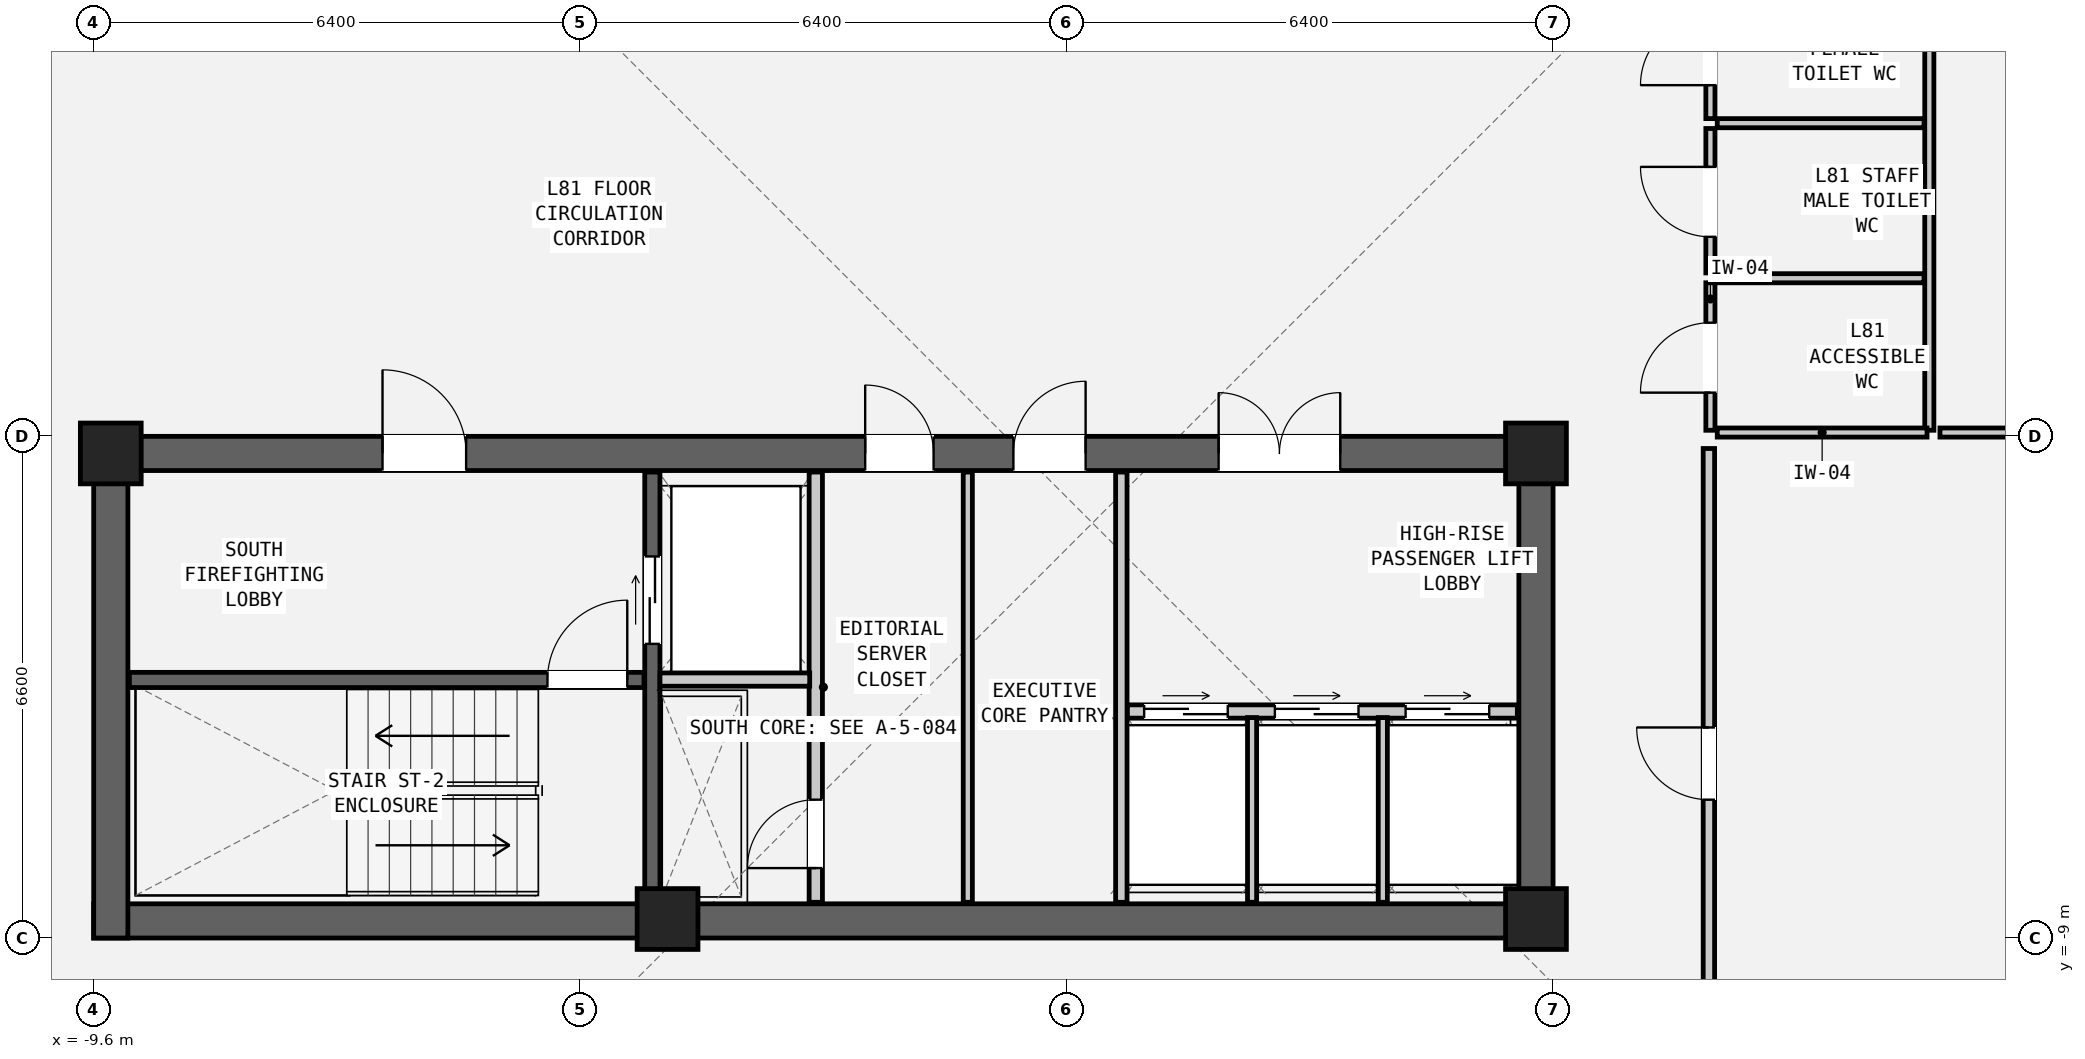
"""IFC4 building model, lengths in metres.
Left out: names, types, materials, properties, quantities, classifications, styles, units other than length and angle.
Written with IfcOpenShell. Run it as: python <this file> out.ifc"""

import sys

from ifc_helpers import new_model, si_unit, direction, frame, frame_2d, origin, origin_2d, place, context, subcontext, project, spatial, rectangle, extrude, element, fill, save


model = new_model("IFC4")
c1 = context("Model", 3, precision=1e-05, world=origin(), true_north=direction((0.0, 1.0)))
c2 = subcontext(c1, "Body", "Model", "MODEL_VIEW")
j1 = project(units=[si_unit("LENGTHUNIT", "METRE"), si_unit("PLANEANGLEUNIT", "RADIAN")], contexts=[c1])
p1 = place(None, origin())
s1 = spatial("IfcSite", under=j1, at=p1, CompositionType="ELEMENT")
p2 = place(p1, origin())
s2 = spatial("IfcBuilding", under=s1, at=p2, CompositionType="ELEMENT")
p3 = place(p2, frame((0.0, 0.0, 273.35)))
s3 = spatial("IfcBuildingStorey", under=s2, at=p3, CompositionType="ELEMENT", Elevation=273.35)
p4 = place(p3, frame((-9.6, -8.775, 0.0), z_axis=(0.0, 0.0, 1.0), x_axis=(1.0, 0.0, 0.0)))
e1 = element("IfcWall", 1, at=p4, inside=s3, PredefinedType="SHEAR", context=c2, shape_type="SweptSolid", body=[
    extrude(rectangle(XDim=19.2, YDim=0.45, at=frame_2d((9.6, 0.0))), origin(), (0.0, 0.0, 1.0), 3.6),
])
p5 = place(p3, frame((-9.6, -2.625, 0.0), z_axis=(0.0, 0.0, 1.0), x_axis=(1.0, 0.0, 0.0)))
e2 = element("IfcWall", 2, at=p5, inside=s3, PredefinedType="SHEAR", context=c2, shape_type="SweptSolid", body=[
    extrude(rectangle(XDim=19.2, YDim=0.45, at=frame_2d((9.6, 0.0))), origin(), (0.0, 0.0, 1.0), 3.6),
])
p6 = place(p5, frame((3.8, 0.0, 0.0)))
e3 = element("IfcOpeningElement", 3, at=p6, cuts=e2, PredefinedType="OPENING", context=c2, shape_type="SweptSolid", body=[
    extrude(rectangle(XDim=1.1, YDim=2.08, at=frame_2d((0.55, 1.04))), frame((0.0, 0.237, 0.0), z_axis=(0.0, -1.0, 0.0), x_axis=(1.0, 0.0, 0.0)), (0.0, 0.0, 1.0), 0.474),
])
p7 = place(p5, frame((10.15, 0.0, 0.0)))
e4 = element("IfcOpeningElement", 4, at=p7, cuts=e2, PredefinedType="OPENING", context=c2, shape_type="SweptSolid", body=[
    extrude(rectangle(XDim=0.9, YDim=2.05, at=frame_2d((0.45, 1.025))), frame((0.0, 0.237, 0.0), z_axis=(0.0, -1.0, 0.0), x_axis=(1.0, 0.0, 0.0)), (0.0, 0.0, 1.0), 0.474),
])
p8 = place(p5, frame((12.1, 0.0, 0.0)))
e5 = element("IfcOpeningElement", 5, at=p8, cuts=e2, PredefinedType="OPENING", context=c2, shape_type="SweptSolid", body=[
    extrude(rectangle(XDim=0.95, YDim=2.1, at=frame_2d((0.475, 1.05))), frame((0.0, 0.237, 0.0), z_axis=(0.0, -1.0, 0.0), x_axis=(1.0, 0.0, 0.0)), (0.0, 0.0, 1.0), 0.474),
])
p9 = place(p5, frame((14.8, 0.0, 0.0)))
e6 = element("IfcOpeningElement", 6, at=p9, cuts=e2, PredefinedType="OPENING", context=c2, shape_type="SweptSolid", body=[
    extrude(rectangle(XDim=1.6, YDim=2.12, at=frame_2d((0.8, 1.06))), frame((0.0, 0.237, 0.0), z_axis=(0.0, -1.0, 0.0), x_axis=(1.0, 0.0, 0.0)), (0.0, 0.0, 1.0), 0.474),
])
for number, where, z_axis, x_axis in (
    (7, (-9.375, -9.0, 0.0), (0.0, 0.0, 1.0), (0.0, 1.0, 0.0)),
    (8, (9.375, -9.0, 0.0), (0.0, 0.0, 1.0), (0.0, 1.0, 0.0)),
):
    element("IfcWall", number, at=place(p3, frame(where, z_axis=z_axis, x_axis=x_axis)), inside=s3, PredefinedType="SHEAR", context=c2, shape_type="SweptSolid", body=[
        extrude(rectangle(XDim=6.6, YDim=0.45, at=frame_2d((3.3, 0.0))), origin(), (0.0, 0.0, 1.0), 3.6),
    ])
for number, where, z_axis, x_axis in (
    (9, (-9.375, -2.625, 0.0), (0.0, 0.0, 1.0), (1.0, 0.0, 0.0)),
    (10, (9.375, -2.625, 0.0), (0.0, 0.0, 1.0), (1.0, 0.0, 0.0)),
    (11, (-2.05, -8.75, 0.0), (0.0, 0.0, 1.0), (1.0, 0.0, 0.0)),
    (12, (9.375, -8.75, 0.0), (0.0, 0.0, 1.0), (1.0, 0.0, 0.0)),
):
    element("IfcColumn", number, at=place(p3, frame(where, z_axis=z_axis, x_axis=x_axis)), inside=s3, PredefinedType="COLUMN", context=c2, shape_type="SweptSolid", body=[
        extrude(rectangle(XDim=0.8, YDim=0.8, at=origin_2d()), origin(), (0.0, 0.0, 1.0), 3.6),
    ])
p10 = place(p3, frame((-9.13, -5.605, 0.0), z_axis=(0.0, 0.0, 1.0), x_axis=(1.0, 0.0, 0.0)))
e13 = element("IfcWall", 13, at=p10, inside=s3, PredefinedType="SHEAR", context=c2, shape_type="SweptSolid", body=[
    extrude(rectangle(XDim=6.77, YDim=0.2, at=frame_2d((3.385, 0.0))), origin(), (0.0, 0.0, 1.0), 3.41),
])
p11 = place(p10, frame((5.5, 0.0, 0.0)))
e14 = element("IfcOpeningElement", 14, at=p11, cuts=e13, PredefinedType="OPENING", context=c2, shape_type="SweptSolid", body=[
    extrude(rectangle(XDim=1.05, YDim=2.08, at=frame_2d((0.525, 1.04))), frame((0.0, 0.112, 0.0), z_axis=(0.0, -1.0, 0.0), x_axis=(1.0, 0.0, 0.0)), (0.0, 0.0, 1.0), 0.224),
])
p12 = place(p3, frame((-2.25, -8.53, 0.0), z_axis=(0.0, 0.0, 1.0), x_axis=(0.0, 1.0, 0.0)))
e15 = element("IfcWall", 15, at=p12, inside=s3, PredefinedType="SHEAR", context=c2, shape_type="SweptSolid", body=[
    extrude(rectangle(XDim=5.66, YDim=0.2, at=frame_2d((2.83, 0.0))), origin(), (0.0, 0.0, 1.0), 3.41),
])
p13 = place(p12, frame((3.4, 0.0, 0.0)))
e16 = element("IfcOpeningElement", 16, at=p13, cuts=e15, PredefinedType="OPENING", context=c2, shape_type="SweptSolid", body=[
    extrude(rectangle(XDim=1.15, YDim=2.08, at=frame_2d((0.575, 1.04))), frame((0.0, 0.112, 0.0), z_axis=(0.0, -1.0, 0.0), x_axis=(1.0, 0.0, 0.0)), (0.0, 0.0, 1.0), 0.224),
])
p14 = place(p3, frame((-0.1, -8.53, 0.0), z_axis=(0.0, 0.0, 1.0), x_axis=(0.0, 1.0, 0.0)))
e17 = element("IfcWall", 17, at=p14, inside=s3, PredefinedType="PARTITIONING", context=c2, shape_type="SweptSolid", body=[
    extrude(rectangle(XDim=5.66, YDim=0.175, at=frame_2d((2.83, 0.0))), origin(), (0.0, 0.0, 1.0), 3.41),
])
p15 = place(p14, frame((0.45, 0.0, 0.0)))
e18 = element("IfcOpeningElement", 18, at=p15, cuts=e17, PredefinedType="OPENING", context=c2, shape_type="SweptSolid", body=[
    extrude(rectangle(XDim=0.9, YDim=2.05, at=frame_2d((0.45, 1.025))), frame((0.0, 0.1, 0.0), z_axis=(0.0, -1.0, 0.0), x_axis=(1.0, 0.0, 0.0)), (0.0, 0.0, 1.0), 0.199),
])
p16 = place(p3, frame((-2.15, -5.6, 0.0), z_axis=(0.0, 0.0, 1.0), x_axis=(1.0, 0.0, 0.0)))
e19 = element("IfcWall", 19, at=p16, inside=s3, PredefinedType="PARTITIONING", context=c2, shape_type="SweptSolid", body=[
    extrude(rectangle(XDim=1.97, YDim=0.175, at=frame_2d((0.985, 0.0))), origin(), (0.0, 0.0, 1.0), 3.41),
])
p17 = place(p3, frame((3.92, -8.53, 0.0), z_axis=(0.0, 0.0, 1.0), x_axis=(0.0, 1.0, 0.0)))
e20 = element("IfcWall", 20, at=p17, inside=s3, PredefinedType="PARTITIONING", context=c2, shape_type="SweptSolid", body=[
    extrude(rectangle(XDim=5.66, YDim=0.15, at=frame_2d((2.83, 0.0))), origin(), (0.0, 0.0, 1.0), 3.41),
])
p18 = place(p3, frame((1.9, -8.53, 0.0), z_axis=(0.0, 0.0, 1.0), x_axis=(0.0, 1.0, 0.0)))
e21 = element("IfcWall", 21, at=p18, inside=s3, PredefinedType="PARTITIONING", context=c2, shape_type="SweptSolid", body=[
    extrude(rectangle(XDim=5.66, YDim=0.12, at=frame_2d((2.83, 0.0))), origin(), (0.0, 0.0, 1.0), 3.41),
])
p19 = place(p3, frame((4.0, -6.02, 0.0), z_axis=(0.0, 0.0, 1.0), x_axis=(1.0, 0.0, 0.0)))
e22 = element("IfcWall", 22, at=p19, inside=s3, PredefinedType="PARTITIONING", context=c2, shape_type="SweptSolid", body=[
    extrude(rectangle(XDim=5.13, YDim=0.175, at=frame_2d((2.565, 0.0))), origin(), (0.0, 0.0, 1.0), 3.41),
])
p20 = place(p19, frame((0.22, 0.0, 0.0)))
e23 = element("IfcOpeningElement", 23, at=p20, cuts=e22, PredefinedType="OPENING", context=c2, shape_type="SweptSolid", body=[
    extrude(rectangle(XDim=1.1, YDim=2.06, at=frame_2d((0.55, 1.03))), frame((0.0, 0.1, 0.0), z_axis=(0.0, -1.0, 0.0), x_axis=(1.0, 0.0, 0.0)), (0.0, 0.0, 1.0), 0.199),
])
p21 = place(p19, frame((1.94, 0.0, 0.0)))
e24 = element("IfcOpeningElement", 24, at=p21, cuts=e22, PredefinedType="OPENING", context=c2, shape_type="SweptSolid", body=[
    extrude(rectangle(XDim=1.1, YDim=2.06, at=frame_2d((0.55, 1.03))), frame((0.0, 0.1, 0.0), z_axis=(0.0, -1.0, 0.0), x_axis=(1.0, 0.0, 0.0)), (0.0, 0.0, 1.0), 0.199),
])
p22 = place(p19, frame((3.66, 0.0, 0.0)))
e25 = element("IfcOpeningElement", 25, at=p22, cuts=e22, PredefinedType="OPENING", context=c2, shape_type="SweptSolid", body=[
    extrude(rectangle(XDim=1.1, YDim=2.06, at=frame_2d((0.55, 1.03))), frame((0.0, 0.1, 0.0), z_axis=(0.0, -1.0, 0.0), x_axis=(1.0, 0.0, 0.0)), (0.0, 0.0, 1.0), 0.199),
])
for number, where, z_axis, x_axis in (
    (26, (5.64, -8.53, 0.0), (0.0, 0.0, 1.0), (0.0, 1.0, 0.0)),
    (27, (7.36, -8.53, 0.0), (0.0, 0.0, 1.0), (0.0, 1.0, 0.0)),
):
    element("IfcWall", number, at=place(p3, frame(where, z_axis=z_axis, x_axis=x_axis)), inside=s3, PredefinedType="PARTITIONING", context=c2, shape_type="SweptSolid", body=[
        extrude(rectangle(XDim=2.43, YDim=0.12, at=frame_2d((1.215, 0.0))), origin(), (0.0, 0.0, 1.0), 3.41),
    ])
p23 = place(p3, frame((11.67, -2.32, 0.0), z_axis=(0.0, 0.0, 1.0), x_axis=(0.0, 1.0, 0.0)))
e28 = element("IfcWall", 28, at=p23, inside=s3, PredefinedType="PARTITIONING", context=c2, shape_type="SweptSolid", body=[
    extrude(rectangle(XDim=1.94, YDim=0.12, at=frame_2d((0.97, 0.0))), origin(), (0.0, 0.0, 1.0), 3.41),
])
p24 = place(p23, frame((0.495, 0.0, 0.0)))
e29 = element("IfcOpeningElement", 29, at=p24, cuts=e28, PredefinedType="OPENING", context=c2, shape_type="SweptSolid", body=[
    extrude(rectangle(XDim=0.92, YDim=2.1, at=frame_2d((0.46, 1.05))), frame((0.0, 0.072, 0.0), z_axis=(0.0, -1.0, 0.0), x_axis=(1.0, 0.0, 0.0)), (0.0, 0.0, 1.0), 0.144),
])
p25 = place(p3, frame((11.67, -0.25, 0.0), z_axis=(0.0, 0.0, 1.0), x_axis=(0.0, 1.0, 0.0)))
e30 = element("IfcWall", 30, at=p25, inside=s3, PredefinedType="PARTITIONING", context=c2, shape_type="SweptSolid", body=[
    extrude(rectangle(XDim=1.9, YDim=0.12, at=frame_2d((0.95, 0.0))), origin(), (0.0, 0.0, 1.0), 3.41),
])
p26 = place(p25, frame((0.475, 0.0, 0.0)))
e31 = element("IfcOpeningElement", 31, at=p26, cuts=e30, PredefinedType="OPENING", context=c2, shape_type="SweptSolid", body=[
    extrude(rectangle(XDim=0.92, YDim=2.1, at=frame_2d((0.46, 1.05))), frame((0.0, 0.072, 0.0), z_axis=(0.0, -1.0, 0.0), x_axis=(1.0, 0.0, 0.0)), (0.0, 0.0, 1.0), 0.144),
])
p27 = place(p3, frame((11.67, 1.78, 0.0), z_axis=(0.0, 0.0, 1.0), x_axis=(0.0, 1.0, 0.0)))
e32 = element("IfcWall", 32, at=p27, inside=s3, PredefinedType="PARTITIONING", context=c2, shape_type="SweptSolid", body=[
    extrude(rectangle(XDim=1.83, YDim=0.12, at=frame_2d((0.915, 0.0))), origin(), (0.0, 0.0, 1.0), 3.41),
])
p28 = place(p27, frame((0.44, 0.0, 0.0)))
e33 = element("IfcOpeningElement", 33, at=p28, cuts=e32, PredefinedType="OPENING", context=c2, shape_type="SweptSolid", body=[
    extrude(rectangle(XDim=0.92, YDim=2.1, at=frame_2d((0.46, 1.05))), frame((0.0, 0.072, 0.0), z_axis=(0.0, -1.0, 0.0), x_axis=(1.0, 0.0, 0.0)), (0.0, 0.0, 1.0), 0.144),
])
p29 = place(p3, frame((14.55, -2.32, 0.0), z_axis=(0.0, 0.0, 1.0), x_axis=(0.0, 1.0, 0.0)))
e34 = element("IfcWall", 34, at=p29, inside=s3, PredefinedType="PARTITIONING", context=c2, shape_type="SweptSolid", body=[
    extrude(rectangle(XDim=5.93, YDim=0.12, at=frame_2d((2.965, 0.0))), origin(), (0.0, 0.0, 1.0), 3.41),
])
p30 = place(p3, frame((11.76, -2.35, 0.0), z_axis=(0.0, 0.0, 1.0), x_axis=(1.0, 0.0, 0.0)))
e35 = element("IfcWall", 35, at=p30, inside=s3, PredefinedType="PARTITIONING", context=c2, shape_type="SweptSolid", body=[
    extrude(rectangle(XDim=2.76, YDim=0.12, at=frame_2d((1.38, 0.0))), origin(), (0.0, 0.0, 1.0), 2.61),
])
for number, where, z_axis, x_axis in (
    (36, (11.76, -0.32, 0.0), (0.0, 0.0, 1.0), (1.0, 0.0, 0.0)),
    (37, (11.76, 1.72, 0.0), (0.0, 0.0, 1.0), (1.0, 0.0, 0.0)),
):
    element("IfcWall", number, at=place(p3, frame(where, z_axis=z_axis, x_axis=x_axis)), inside=s3, PredefinedType="PARTITIONING", context=c2, shape_type="SweptSolid", body=[
        extrude(rectangle(XDim=2.72, YDim=0.12, at=frame_2d((1.36, 0.0))), origin(), (0.0, 0.0, 1.0), 3.41),
    ])
p31 = place(p3, frame((14.69, -2.35, 0.0), z_axis=(0.0, 0.0, 1.0), x_axis=(1.0, 0.0, 0.0)))
e38 = element("IfcWall", 38, at=p31, inside=s3, PredefinedType="PARTITIONING", context=c2, shape_type="SweptSolid", body=[
    extrude(rectangle(XDim=6.927, YDim=0.12, at=frame_2d((3.464, 0.0))), origin(), (0.0, 0.0, 1.0), 2.61),
])
p32 = place(p3, frame((11.65, -10.85, 0.0), z_axis=(0.0, 0.0, 1.0), x_axis=(0.0, 1.0, 0.0)))
e39 = element("IfcWall", 39, at=p32, inside=s3, PredefinedType="PARTITIONING", context=c2, shape_type="SweptSolid", body=[
    extrude(rectangle(XDim=8.29, YDim=0.15, at=frame_2d((4.145, 0.0))), origin(), (0.0, 0.0, 1.0), 3.41),
])
p33 = place(p32, frame((3.67, 0.0, 0.0)))
e40 = element("IfcOpeningElement", 40, at=p33, cuts=e39, PredefinedType="OPENING", context=c2, shape_type="SweptSolid", body=[
    extrude(rectangle(XDim=0.95, YDim=2.1, at=frame_2d((0.475, 1.05))), frame((0.0, 0.087, 0.0), z_axis=(0.0, -1.0, 0.0), x_axis=(1.0, 0.0, 0.0)), (0.0, 0.0, 1.0), 0.174),
])
p34 = place(p11, origin())
e41 = element("IfcDoor", 41, at=p34, inside=s3, OperationType="SINGLE_SWING_RIGHT", PredefinedType="DOOR", context=c2, shape_type="SweptSolid", body=[
    extrude(rectangle(XDim=1.05, YDim=2.08, at=frame_2d((0.525, 1.04))), frame((0.0, 0.025, 0.0), z_axis=(0.0, -1.0, 0.0), x_axis=(1.0, 0.0, 0.0)), (0.0, 0.0, 1.0), 0.05),
])
fill(e14, e41)
p35 = place(p6, origin())
e42 = element("IfcDoor", 42, at=p35, inside=s3, OperationType="SINGLE_SWING_LEFT", PredefinedType="DOOR", context=c2, shape_type="SweptSolid", body=[
    extrude(rectangle(XDim=1.1, YDim=2.08, at=frame_2d((0.55, 1.04))), frame((0.0, 0.025, 0.0), z_axis=(0.0, -1.0, 0.0), x_axis=(1.0, 0.0, 0.0)), (0.0, 0.0, 1.0), 0.05),
])
fill(e3, e42)
p36 = place(p13, origin())
e43 = element("IfcDoor", 43, at=p36, inside=s3, OperationType="DOUBLE_DOOR_SLIDING", PredefinedType="DOOR", context=c2, shape_type="SweptSolid", body=[
    extrude(rectangle(XDim=1.15, YDim=2.08, at=frame_2d((0.575, 1.04))), frame((0.0, 0.025, 0.0), z_axis=(0.0, -1.0, 0.0), x_axis=(1.0, 0.0, 0.0)), (0.0, 0.0, 1.0), 0.05),
])
fill(e16, e43)
p37 = place(p15, origin())
e44 = element("IfcDoor", 44, at=p37, inside=s3, OperationType="SINGLE_SWING_LEFT", PredefinedType="DOOR", context=c2, shape_type="SweptSolid", body=[
    extrude(rectangle(XDim=0.9, YDim=2.05, at=frame_2d((0.45, 1.025))), frame((0.0, 0.025, 0.0), z_axis=(0.0, -1.0, 0.0), x_axis=(1.0, 0.0, 0.0)), (0.0, 0.0, 1.0), 0.05),
])
fill(e18, e44)
p38 = place(p7, origin())
e45 = element("IfcDoor", 45, at=p38, inside=s3, OperationType="SINGLE_SWING_LEFT", PredefinedType="DOOR", context=c2, shape_type="SweptSolid", body=[
    extrude(rectangle(XDim=0.9, YDim=2.05, at=frame_2d((0.45, 1.025))), frame((0.0, 0.025, 0.0), z_axis=(0.0, -1.0, 0.0), x_axis=(1.0, 0.0, 0.0)), (0.0, 0.0, 1.0), 0.05),
])
fill(e4, e45)
p39 = place(p8, origin())
e46 = element("IfcDoor", 46, at=p39, inside=s3, OperationType="SINGLE_SWING_RIGHT", PredefinedType="DOOR", context=c2, shape_type="SweptSolid", body=[
    extrude(rectangle(XDim=0.95, YDim=2.1, at=frame_2d((0.475, 1.05))), frame((0.0, 0.025, 0.0), z_axis=(0.0, -1.0, 0.0), x_axis=(1.0, 0.0, 0.0)), (0.0, 0.0, 1.0), 0.05),
])
fill(e5, e46)
p40 = place(p20, origin())
e47 = element("IfcDoor", 47, at=p40, inside=s3, OperationType="DOUBLE_DOOR_SLIDING", PredefinedType="DOOR", context=c2, shape_type="SweptSolid", body=[
    extrude(rectangle(XDim=1.1, YDim=2.06, at=frame_2d((0.55, 1.03))), frame((0.0, 0.025, 0.0), z_axis=(0.0, -1.0, 0.0), x_axis=(1.0, 0.0, 0.0)), (0.0, 0.0, 1.0), 0.05),
])
fill(e23, e47)
p41 = place(p21, origin())
e48 = element("IfcDoor", 48, at=p41, inside=s3, OperationType="DOUBLE_DOOR_SLIDING", PredefinedType="DOOR", context=c2, shape_type="SweptSolid", body=[
    extrude(rectangle(XDim=1.1, YDim=2.06, at=frame_2d((0.55, 1.03))), frame((0.0, 0.025, 0.0), z_axis=(0.0, -1.0, 0.0), x_axis=(1.0, 0.0, 0.0)), (0.0, 0.0, 1.0), 0.05),
])
fill(e24, e48)
p42 = place(p22, origin())
e49 = element("IfcDoor", 49, at=p42, inside=s3, OperationType="DOUBLE_DOOR_SLIDING", PredefinedType="DOOR", context=c2, shape_type="SweptSolid", body=[
    extrude(rectangle(XDim=1.1, YDim=2.06, at=frame_2d((0.55, 1.03))), frame((0.0, 0.025, 0.0), z_axis=(0.0, -1.0, 0.0), x_axis=(1.0, 0.0, 0.0)), (0.0, 0.0, 1.0), 0.05),
])
fill(e25, e49)
p43 = place(p9, origin())
e50 = element("IfcDoor", 50, at=p43, inside=s3, OperationType="DOUBLE_DOOR_SINGLE_SWING", PredefinedType="DOOR", context=c2, shape_type="SweptSolid", body=[
    extrude(rectangle(XDim=1.6, YDim=2.12, at=frame_2d((0.8, 1.06))), frame((0.0, 0.025, 0.0), z_axis=(0.0, -1.0, 0.0), x_axis=(1.0, 0.0, 0.0)), (0.0, 0.0, 1.0), 0.05),
])
fill(e6, e50)
p44 = place(p24, origin())
e51 = element("IfcDoor", 51, at=p44, inside=s3, OperationType="SINGLE_SWING_LEFT", PredefinedType="DOOR", context=c2, shape_type="SweptSolid", body=[
    extrude(rectangle(XDim=0.92, YDim=2.1, at=frame_2d((0.46, 1.05))), frame((0.0, 0.025, 0.0), z_axis=(0.0, -1.0, 0.0), x_axis=(1.0, 0.0, 0.0)), (0.0, 0.0, 1.0), 0.05),
])
fill(e29, e51)
p45 = place(p26, origin())
e52 = element("IfcDoor", 52, at=p45, inside=s3, OperationType="SINGLE_SWING_RIGHT", PredefinedType="DOOR", context=c2, shape_type="SweptSolid", body=[
    extrude(rectangle(XDim=0.92, YDim=2.1, at=frame_2d((0.46, 1.05))), frame((0.0, 0.025, 0.0), z_axis=(0.0, -1.0, 0.0), x_axis=(1.0, 0.0, 0.0)), (0.0, 0.0, 1.0), 0.05),
])
fill(e31, e52)
p46 = place(p28, origin())
e53 = element("IfcDoor", 53, at=p46, inside=s3, OperationType="SINGLE_SWING_LEFT", PredefinedType="DOOR", context=c2, shape_type="SweptSolid", body=[
    extrude(rectangle(XDim=0.92, YDim=2.1, at=frame_2d((0.46, 1.05))), frame((0.0, 0.025, 0.0), z_axis=(0.0, -1.0, 0.0), x_axis=(1.0, 0.0, 0.0)), (0.0, 0.0, 1.0), 0.05),
])
fill(e33, e53)
p47 = place(p33, origin())
e54 = element("IfcDoor", 54, at=p47, inside=s3, OperationType="SINGLE_SWING_RIGHT", PredefinedType="DOOR", context=c2, shape_type="SweptSolid", body=[
    extrude(rectangle(XDim=0.95, YDim=2.1, at=frame_2d((0.475, 1.05))), frame((0.0, 0.025, 0.0), z_axis=(0.0, -1.0, 0.0), x_axis=(1.0, 0.0, 0.0)), (0.0, 0.0, 1.0), 0.05),
])
fill(e40, e54)
save(model, sys.argv[1])
